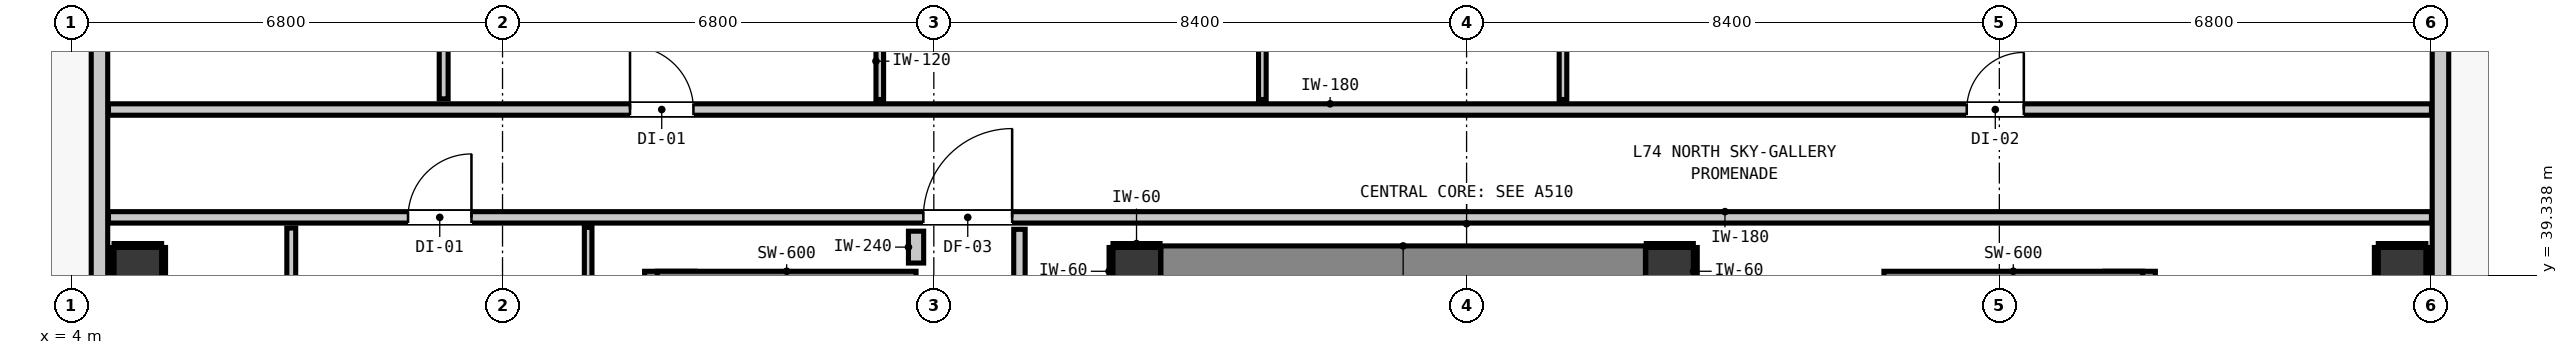
"""IFC4 building model, lengths in metres.
Left out: names, types, materials, properties, quantities, classifications, styles, units other than length and angle.
Written with IfcOpenShell. Run it as: python <this file> out.ifc"""

import sys

from ifc_helpers import new_model, si_unit, direction, frame, frame_2d, origin, origin_2d, place, context, subcontext, project, spatial, rectangle, extrude, element, fill, save


model = new_model("IFC4")
c1 = context("Model", 3, precision=1e-05, world=origin(), true_north=direction((0.0, 1.0)))
c2 = subcontext(c1, "Body", "Model", "MODEL_VIEW")
j1 = project(units=[si_unit("LENGTHUNIT", "METRE"), si_unit("PLANEANGLEUNIT", "RADIAN")], contexts=[c1])
p1 = place(None, origin())
s1 = spatial("IfcSite", under=j1, at=p1, CompositionType="ELEMENT")
p2 = place(p1, origin())
s2 = spatial("IfcBuilding", under=s1, at=p2, CompositionType="ELEMENT")
p3 = place(p2, frame((0.0, 0.0, 254.52)))
s3 = spatial("IfcBuildingStorey", under=s2, at=p3, CompositionType="ELEMENT", Elevation=254.52)
for number, where, z_axis, x_axis in (
    (1, (20.8, 39.4, 0.0), (0.0, 0.0, 1.0), (1.0, 0.0, 0.0)),
    (2, (29.2, 39.4, 0.0), (0.0, 0.0, 1.0), (1.0, 0.0, 0.0)),
):
    element("IfcColumn", number, at=place(p3, frame(where, z_axis=z_axis, x_axis=x_axis)), inside=s3, PredefinedType="COLUMN", context=c2, shape_type="SweptSolid", body=[
        extrude(rectangle(XDim=0.75, YDim=0.75, at=origin_2d()), origin(), (0.0, 0.0, 1.0), 3.32),
    ])
p4 = place(p3, frame((13.44, 31.08, 0.0), z_axis=(0.0, 0.0, 1.0), x_axis=(0.0, 1.0, 0.0)))
e3 = element("IfcWall", 3, at=p4, inside=s3, PredefinedType="SHEAR", context=c2, shape_type="SweptSolid", body=[
    extrude(rectangle(XDim=8.32, YDim=0.8, at=frame_2d((4.16, 0.0))), origin(), (0.0, 0.0, 1.0), 3.32),
])
p5 = place(p3, frame((13.24, 39.1, 0.0), z_axis=(0.0, 0.0, 1.0), x_axis=(1.0, 0.0, 0.0)))
e4 = element("IfcWall", 4, at=p5, inside=s3, PredefinedType="SHEAR", context=c2, shape_type="SweptSolid", body=[
    extrude(rectangle(XDim=4.08, YDim=0.6, at=frame_2d((2.04, 0.0))), origin(), (0.0, 0.0, 1.0), 3.32),
])
p6 = place(p3, frame((36.46, 31.08, 0.0), z_axis=(0.0, 0.0, 1.0), x_axis=(0.0, 1.0, 0.0)))
e5 = element("IfcWall", 5, at=p6, inside=s3, PredefinedType="SHEAR", context=c2, shape_type="SweptSolid", body=[
    extrude(rectangle(XDim=8.32, YDim=0.8, at=frame_2d((4.16, 0.0))), origin(), (0.0, 0.0, 1.0), 3.32),
])
p7 = place(p3, frame((32.58, 39.1, 0.0), z_axis=(0.0, 0.0, 1.0), x_axis=(1.0, 0.0, 0.0)))
e6 = element("IfcWall", 6, at=p7, inside=s3, PredefinedType="SHEAR", context=c2, shape_type="SweptSolid", body=[
    extrude(rectangle(XDim=4.08, YDim=0.6, at=frame_2d((2.04, 0.0))), origin(), (0.0, 0.0, 1.0), 3.32),
])
p8 = place(p3, frame((21.18, 39.4, 0.0), z_axis=(0.0, 0.0, 1.0), x_axis=(1.0, 0.0, 0.0)))
e7 = element("IfcWall", 7, at=p8, inside=s3, PredefinedType="SHEAR", context=c2, shape_type="SweptSolid", body=[
    extrude(rectangle(XDim=7.64, YDim=0.8, at=frame_2d((3.82, 0.0))), origin(), (0.0, 0.0, 1.0), 3.32),
])
for number, where, z_axis, x_axis in (
    (8, (5.05, 39.4, 0.0), (0.0, 0.0, 1.0), (1.0, 0.0, 0.0)),
    (9, (40.75, 39.4, 0.0), (0.0, 0.0, 1.0), (1.0, 0.0, 0.0)),
):
    element("IfcColumn", number, at=place(p3, frame(where, z_axis=z_axis, x_axis=x_axis)), inside=s3, PredefinedType="COLUMN", context=c2, shape_type="SweptSolid", body=[
        extrude(rectangle(XDim=0.75, YDim=0.75, at=origin_2d()), origin(), (0.0, 0.0, 1.0), 3.32),
    ])
p9 = place(p3, frame((4.445, 18.545, 0.0), z_axis=(0.0, 0.0, 1.0), x_axis=(0.0, 1.0, 0.0)))
e10 = element("IfcWall", 10, at=p9, inside=s3, PredefinedType="STANDARD", context=c2, shape_type="SweptSolid", body=[
    extrude(rectangle(XDim=30.31, YDim=0.26, at=frame_2d((15.155, 0.0))), origin(), (0.0, 0.0, 1.0), 2.96),
])
p10 = place(p9, frame((4.434, 0.0, 0.0)))
e11 = element("IfcOpeningElement", 11, at=p10, cuts=e10, PredefinedType="OPENING", context=c2, shape_type="SweptSolid", body=[
    extrude(rectangle(XDim=1.0, YDim=2.15, at=frame_2d((0.5, 1.075))), frame((0.0, 0.14, 0.0), z_axis=(0.0, -1.0, 0.0), x_axis=(1.0, 0.0, 0.0)), (0.0, 0.0, 1.0), 0.28),
])
p11 = place(p9, frame((27.715, 0.0, 0.85)))
e12 = element("IfcOpeningElement", 12, at=p11, cuts=e10, PredefinedType="OPENING", context=c2, shape_type="SweptSolid", body=[
    extrude(rectangle(XDim=2.1, YDim=1.9, at=frame_2d((1.05, 0.95))), frame((0.0, 0.14, 0.0), z_axis=(0.0, -1.0, 0.0), x_axis=(1.0, 0.0, 0.0)), (0.0, 0.0, 1.0), 0.28),
])
p12 = place(p3, frame((41.355, 48.855, 0.0), z_axis=(0.0, 0.0, 1.0), x_axis=(0.0, -1.0, 0.0)))
e13 = element("IfcWall", 13, at=p12, inside=s3, PredefinedType="STANDARD", context=c2, shape_type="SweptSolid", body=[
    extrude(rectangle(XDim=30.31, YDim=0.26, at=frame_2d((15.155, 0.0))), origin(), (0.0, 0.0, 1.0), 2.96),
])
p13 = place(p12, frame((0.91, 0.0, 0.0)))
e14 = element("IfcOpeningElement", 14, at=p13, cuts=e13, PredefinedType="OPENING", context=c2, shape_type="SweptSolid", body=[
    extrude(rectangle(XDim=1.0, YDim=2.15, at=frame_2d((0.5, 1.075))), frame((0.0, 0.14, 0.0), z_axis=(0.0, -1.0, 0.0), x_axis=(1.0, 0.0, 0.0)), (0.0, 0.0, 1.0), 0.28),
])
p14 = place(p12, frame((3.407, 0.0, 0.85)))
e15 = element("IfcOpeningElement", 15, at=p14, cuts=e13, PredefinedType="OPENING", context=c2, shape_type="SweptSolid", body=[
    extrude(rectangle(XDim=2.1, YDim=1.9, at=frame_2d((1.05, 0.95))), frame((0.0, 0.14, 0.0), z_axis=(0.0, -1.0, 0.0), x_axis=(1.0, 0.0, 0.0)), (0.0, 0.0, 1.0), 0.28),
])
p15 = place(p3, frame((4.587, 40.25, 0.0), z_axis=(0.0, 0.0, 1.0), x_axis=(1.0, 0.0, 0.0)))
e16 = element("IfcWall", 16, at=p15, inside=s3, PredefinedType="PARTITIONING", context=c2, shape_type="SweptSolid", body=[
    extrude(rectangle(XDim=36.626, YDim=0.18, at=frame_2d((18.313, 0.0))), origin(), (0.0, 0.0, 1.0), 2.96),
])
p16 = place(p15, frame((12.848, 0.0, 0.0)))
e17 = element("IfcOpeningElement", 17, at=p16, cuts=e16, PredefinedType="OPENING", context=c2, shape_type="SweptSolid", body=[
    extrude(rectangle(XDim=1.4, YDim=2.15, at=frame_2d((0.7, 1.075))), frame((0.0, 0.1, 0.0), z_axis=(0.0, -1.0, 0.0), x_axis=(1.0, 0.0, 0.0)), (0.0, 0.0, 1.0), 0.2),
])
p17 = place(p15, frame((4.723, 0.0, 0.0)))
e18 = element("IfcOpeningElement", 18, at=p17, cuts=e16, PredefinedType="OPENING", context=c2, shape_type="SweptSolid", body=[
    extrude(rectangle(XDim=1.0, YDim=2.15, at=frame_2d((0.5, 1.075))), frame((0.0, 0.1, 0.0), z_axis=(0.0, -1.0, 0.0), x_axis=(1.0, 0.0, 0.0)), (0.0, 0.0, 1.0), 0.2),
])
p18 = place(p3, frame((4.587, 41.95, 0.0), z_axis=(0.0, 0.0, 1.0), x_axis=(1.0, 0.0, 0.0)))
e19 = element("IfcWall", 19, at=p18, inside=s3, PredefinedType="PARTITIONING", context=c2, shape_type="SweptSolid", body=[
    extrude(rectangle(XDim=36.626, YDim=0.18, at=frame_2d((18.313, 0.0))), origin(), (0.0, 0.0, 1.0), 2.96),
])
p19 = place(p18, frame((8.223, 0.0, 0.0)))
e20 = element("IfcOpeningElement", 20, at=p19, cuts=e19, PredefinedType="OPENING", context=c2, shape_type="SweptSolid", body=[
    extrude(rectangle(XDim=1.0, YDim=2.15, at=frame_2d((0.5, 1.075))), frame((0.0, 0.1, 0.0), z_axis=(0.0, -1.0, 0.0), x_axis=(1.0, 0.0, 0.0)), (0.0, 0.0, 1.0), 0.2),
])
p20 = place(p18, frame((29.299, 0.0, 0.0)))
e21 = element("IfcOpeningElement", 21, at=p20, cuts=e19, PredefinedType="OPENING", context=c2, shape_type="SweptSolid", body=[
    extrude(rectangle(XDim=0.9, YDim=2.1, at=frame_2d((0.45, 1.05))), frame((0.0, 0.1, 0.0), z_axis=(0.0, -1.0, 0.0), x_axis=(1.0, 0.0, 0.0)), (0.0, 0.0, 1.0), 0.2),
])
p21 = place(p3, frame((17.32, 39.53, 0.0), z_axis=(0.0, 0.0, 1.0), x_axis=(0.0, 1.0, 0.0)))
e22 = element("IfcWall", 22, at=p21, inside=s3, PredefinedType="PARTITIONING", context=c2, shape_type="SweptSolid", body=[
    extrude(rectangle(XDim=0.502, YDim=0.24, at=frame_2d((0.251, 0.0))), origin(), (0.0, 0.0, 1.0), 2.96),
])
p22 = place(p3, frame((18.95, 39.058, 0.0), z_axis=(0.0, 0.0, 1.0), x_axis=(0.0, 1.0, 0.0)))
e23 = element("IfcWall", 23, at=p22, inside=s3, PredefinedType="PARTITIONING", context=c2, shape_type="SweptSolid", body=[
    extrude(rectangle(XDim=1.004, YDim=0.18, at=frame_2d((0.502, 0.0))), origin(), (0.0, 0.0, 1.0), 2.96),
])
p23 = place(p3, frame((7.469, 36.635, 0.0), z_axis=(0.0, 0.0, 1.0), x_axis=(0.0, 1.0, 0.0)))
e24 = element("IfcWall", 24, at=p23, inside=s3, PredefinedType="PARTITIONING", context=c2, shape_type="SweptSolid", body=[
    extrude(rectangle(XDim=3.447, YDim=0.14, at=frame_2d((1.724, 0.0))), origin(), (0.0, 0.0, 1.0), 2.96),
])
p24 = place(p23, frame((1.271, 0.0, 0.0)))
e25 = element("IfcOpeningElement", 25, at=p24, cuts=e24, PredefinedType="OPENING", context=c2, shape_type="SweptSolid", body=[
    extrude(rectangle(XDim=0.9, YDim=2.1, at=frame_2d((0.45, 1.05))), frame((0.0, 0.08, 0.0), z_axis=(0.0, -1.0, 0.0), x_axis=(1.0, 0.0, 0.0)), (0.0, 0.0, 1.0), 0.16),
])
p25 = place(p3, frame((9.872, 42.118, 0.0), z_axis=(0.0, 0.0, 1.0), x_axis=(0.0, 1.0, 0.0)))
e26 = element("IfcWall", 26, at=p25, inside=s3, PredefinedType="PARTITIONING", context=c2, shape_type="SweptSolid", body=[
    extrude(rectangle(XDim=3.49, YDim=0.14, at=frame_2d((1.745, 0.0))), origin(), (0.0, 0.0, 1.0), 2.96),
])
p26 = place(p25, frame((1.318, 0.0, 0.0)))
e27 = element("IfcOpeningElement", 27, at=p26, cuts=e26, PredefinedType="OPENING", context=c2, shape_type="SweptSolid", body=[
    extrude(rectangle(XDim=0.86, YDim=2.02, at=frame_2d((0.43, 1.01))), frame((0.0, 0.08, 0.0), z_axis=(0.0, -1.0, 0.0), x_axis=(1.0, 0.0, 0.0)), (0.0, 0.0, 1.0), 0.16),
])
p27 = place(p3, frame((12.15, 31.808, 0.0), z_axis=(0.0, 0.0, 1.0), x_axis=(0.0, 1.0, 0.0)))
e28 = element("IfcWall", 28, at=p27, inside=s3, PredefinedType="PARTITIONING", context=c2, shape_type="SweptSolid", body=[
    extrude(rectangle(XDim=8.284, YDim=0.12, at=frame_2d((4.142, 0.0))), origin(), (0.0, 0.0, 1.0), 2.96),
])
p28 = place(p3, frame((16.748, 42.108, 0.0), z_axis=(0.0, 0.0, 1.0), x_axis=(0.0, 1.0, 0.0)))
e29 = element("IfcWall", 29, at=p28, inside=s3, PredefinedType="PARTITIONING", context=c2, shape_type="SweptSolid", body=[
    extrude(rectangle(XDim=3.51, YDim=0.12, at=frame_2d((1.755, 0.0))), origin(), (0.0, 0.0, 1.0), 2.96),
])
p29 = place(p28, frame((1.308, 0.0, 0.0)))
e30 = element("IfcOpeningElement", 30, at=p29, cuts=e29, PredefinedType="OPENING", context=c2, shape_type="SweptSolid", body=[
    extrude(rectangle(XDim=0.9, YDim=2.1, at=frame_2d((0.45, 1.05))), frame((0.0, 0.07, 0.0), z_axis=(0.0, -1.0, 0.0), x_axis=(1.0, 0.0, 0.0)), (0.0, 0.0, 1.0), 0.14),
])
p30 = place(p3, frame((22.78, 42.108, 0.0), z_axis=(0.0, 0.0, 1.0), x_axis=(0.0, 1.0, 0.0)))
e31 = element("IfcWall", 31, at=p30, inside=s3, PredefinedType="PARTITIONING", context=c2, shape_type="SweptSolid", body=[
    extrude(rectangle(XDim=3.51, YDim=0.12, at=frame_2d((1.755, 0.0))), origin(), (0.0, 0.0, 1.0), 2.96),
])
p31 = place(p30, frame((1.295, 0.0, 0.0)))
e32 = element("IfcOpeningElement", 32, at=p31, cuts=e31, PredefinedType="OPENING", context=c2, shape_type="SweptSolid", body=[
    extrude(rectangle(XDim=0.9, YDim=2.1, at=frame_2d((0.45, 1.05))), frame((0.0, 0.07, 0.0), z_axis=(0.0, -1.0, 0.0), x_axis=(1.0, 0.0, 0.0)), (0.0, 0.0, 1.0), 0.14),
])
p32 = place(p3, frame((27.52, 42.108, 0.0), z_axis=(0.0, 0.0, 1.0), x_axis=(0.0, 1.0, 0.0)))
e33 = element("IfcWall", 33, at=p32, inside=s3, PredefinedType="PARTITIONING", context=c2, shape_type="SweptSolid", body=[
    extrude(rectangle(XDim=3.51, YDim=0.12, at=frame_2d((1.755, 0.0))), origin(), (0.0, 0.0, 1.0), 2.96),
])
p33 = place(p3, frame((20.425, 39.807, 0.0), z_axis=(0.0, 0.0, 1.0), x_axis=(1.0, 0.0, 0.0)))
e34 = element("IfcWall", 34, at=p33, inside=s3, PredefinedType="PARTITIONING", context=c2, shape_type="SweptSolid", body=[
    extrude(rectangle(XDim=0.742, YDim=0.06, at=frame_2d((0.371, 0.0))), origin(), (0.0, 0.0, 1.0), 1.45),
])
p34 = place(p3, frame((20.393, 39.025, 0.0), z_axis=(0.0, 0.0, 1.0), x_axis=(0.0, 1.0, 0.0)))
e35 = element("IfcWall", 35, at=p34, inside=s3, PredefinedType="PARTITIONING", context=c2, shape_type="SweptSolid", body=[
    extrude(rectangle(XDim=0.75, YDim=0.06, at=frame_2d((0.375, 0.0))), origin(), (0.0, 0.0, 1.0), 1.45),
])
p35 = place(p3, frame((28.833, 39.807, 0.0), z_axis=(0.0, 0.0, 1.0), x_axis=(1.0, 0.0, 0.0)))
e36 = element("IfcWall", 36, at=p35, inside=s3, PredefinedType="PARTITIONING", context=c2, shape_type="SweptSolid", body=[
    extrude(rectangle(XDim=0.742, YDim=0.06, at=frame_2d((0.371, 0.0))), origin(), (0.0, 0.0, 1.0), 1.45),
])
for number, where, z_axis, x_axis in (
    (37, (29.607, 39.025, 0.0), (0.0, 0.0, 1.0), (0.0, 1.0, 0.0)),
    (38, (4.675, 39.807, 0.0), (0.0, 0.0, 1.0), (1.0, 0.0, 0.0)),
    (39, (4.643, 39.025, 0.0), (0.0, 0.0, 1.0), (0.0, 1.0, 0.0)),
    (40, (5.457, 39.025, 0.0), (0.0, 0.0, 1.0), (0.0, 1.0, 0.0)),
    (41, (40.375, 39.807, 0.0), (0.0, 0.0, 1.0), (1.0, 0.0, 0.0)),
    (42, (40.343, 39.025, 0.0), (0.0, 0.0, 1.0), (0.0, 1.0, 0.0)),
    (43, (41.157, 39.025, 0.0), (0.0, 0.0, 1.0), (0.0, 1.0, 0.0)),
):
    element("IfcWall", number, at=place(p3, frame(where, z_axis=z_axis, x_axis=x_axis)), inside=s3, PredefinedType="PARTITIONING", context=c2, shape_type="SweptSolid", body=[
        extrude(rectangle(XDim=0.75, YDim=0.06, at=frame_2d((0.375, 0.0))), origin(), (0.0, 0.0, 1.0), 1.45),
    ])
p36 = place(p16, origin())
e44 = element("IfcDoor", 44, at=p36, inside=s3, OperationType="SINGLE_SWING_RIGHT", PredefinedType="DOOR", context=c2, shape_type="SweptSolid", body=[
    extrude(rectangle(XDim=1.4, YDim=2.15, at=frame_2d((0.7, 1.075))), frame((0.0, 0.025, 0.0), z_axis=(0.0, -1.0, 0.0), x_axis=(1.0, 0.0, 0.0)), (0.0, 0.0, 1.0), 0.05),
])
fill(e17, e44)
p37 = place(p19, origin())
e45 = element("IfcDoor", 45, at=p37, inside=s3, OperationType="SINGLE_SWING_LEFT", PredefinedType="DOOR", context=c2, shape_type="SweptSolid", body=[
    extrude(rectangle(XDim=1.0, YDim=2.15, at=frame_2d((0.5, 1.075))), frame((0.0, 0.025, 0.0), z_axis=(0.0, -1.0, 0.0), x_axis=(1.0, 0.0, 0.0)), (0.0, 0.0, 1.0), 0.05),
])
fill(e20, e45)
p38 = place(p20, origin())
e46 = element("IfcDoor", 46, at=p38, inside=s3, OperationType="SINGLE_SWING_RIGHT", PredefinedType="DOOR", context=c2, shape_type="SweptSolid", body=[
    extrude(rectangle(XDim=0.9, YDim=2.1, at=frame_2d((0.45, 1.05))), frame((0.0, 0.025, 0.0), z_axis=(0.0, -1.0, 0.0), x_axis=(1.0, 0.0, 0.0)), (0.0, 0.0, 1.0), 0.05),
])
fill(e21, e46)
p39 = place(p17, origin())
e47 = element("IfcDoor", 47, at=p39, inside=s3, OperationType="SINGLE_SWING_RIGHT", PredefinedType="DOOR", context=c2, shape_type="SweptSolid", body=[
    extrude(rectangle(XDim=1.0, YDim=2.15, at=frame_2d((0.5, 1.075))), frame((0.0, 0.025, 0.0), z_axis=(0.0, -1.0, 0.0), x_axis=(1.0, 0.0, 0.0)), (0.0, 0.0, 1.0), 0.05),
])
fill(e18, e47)
save(model, sys.argv[1])
